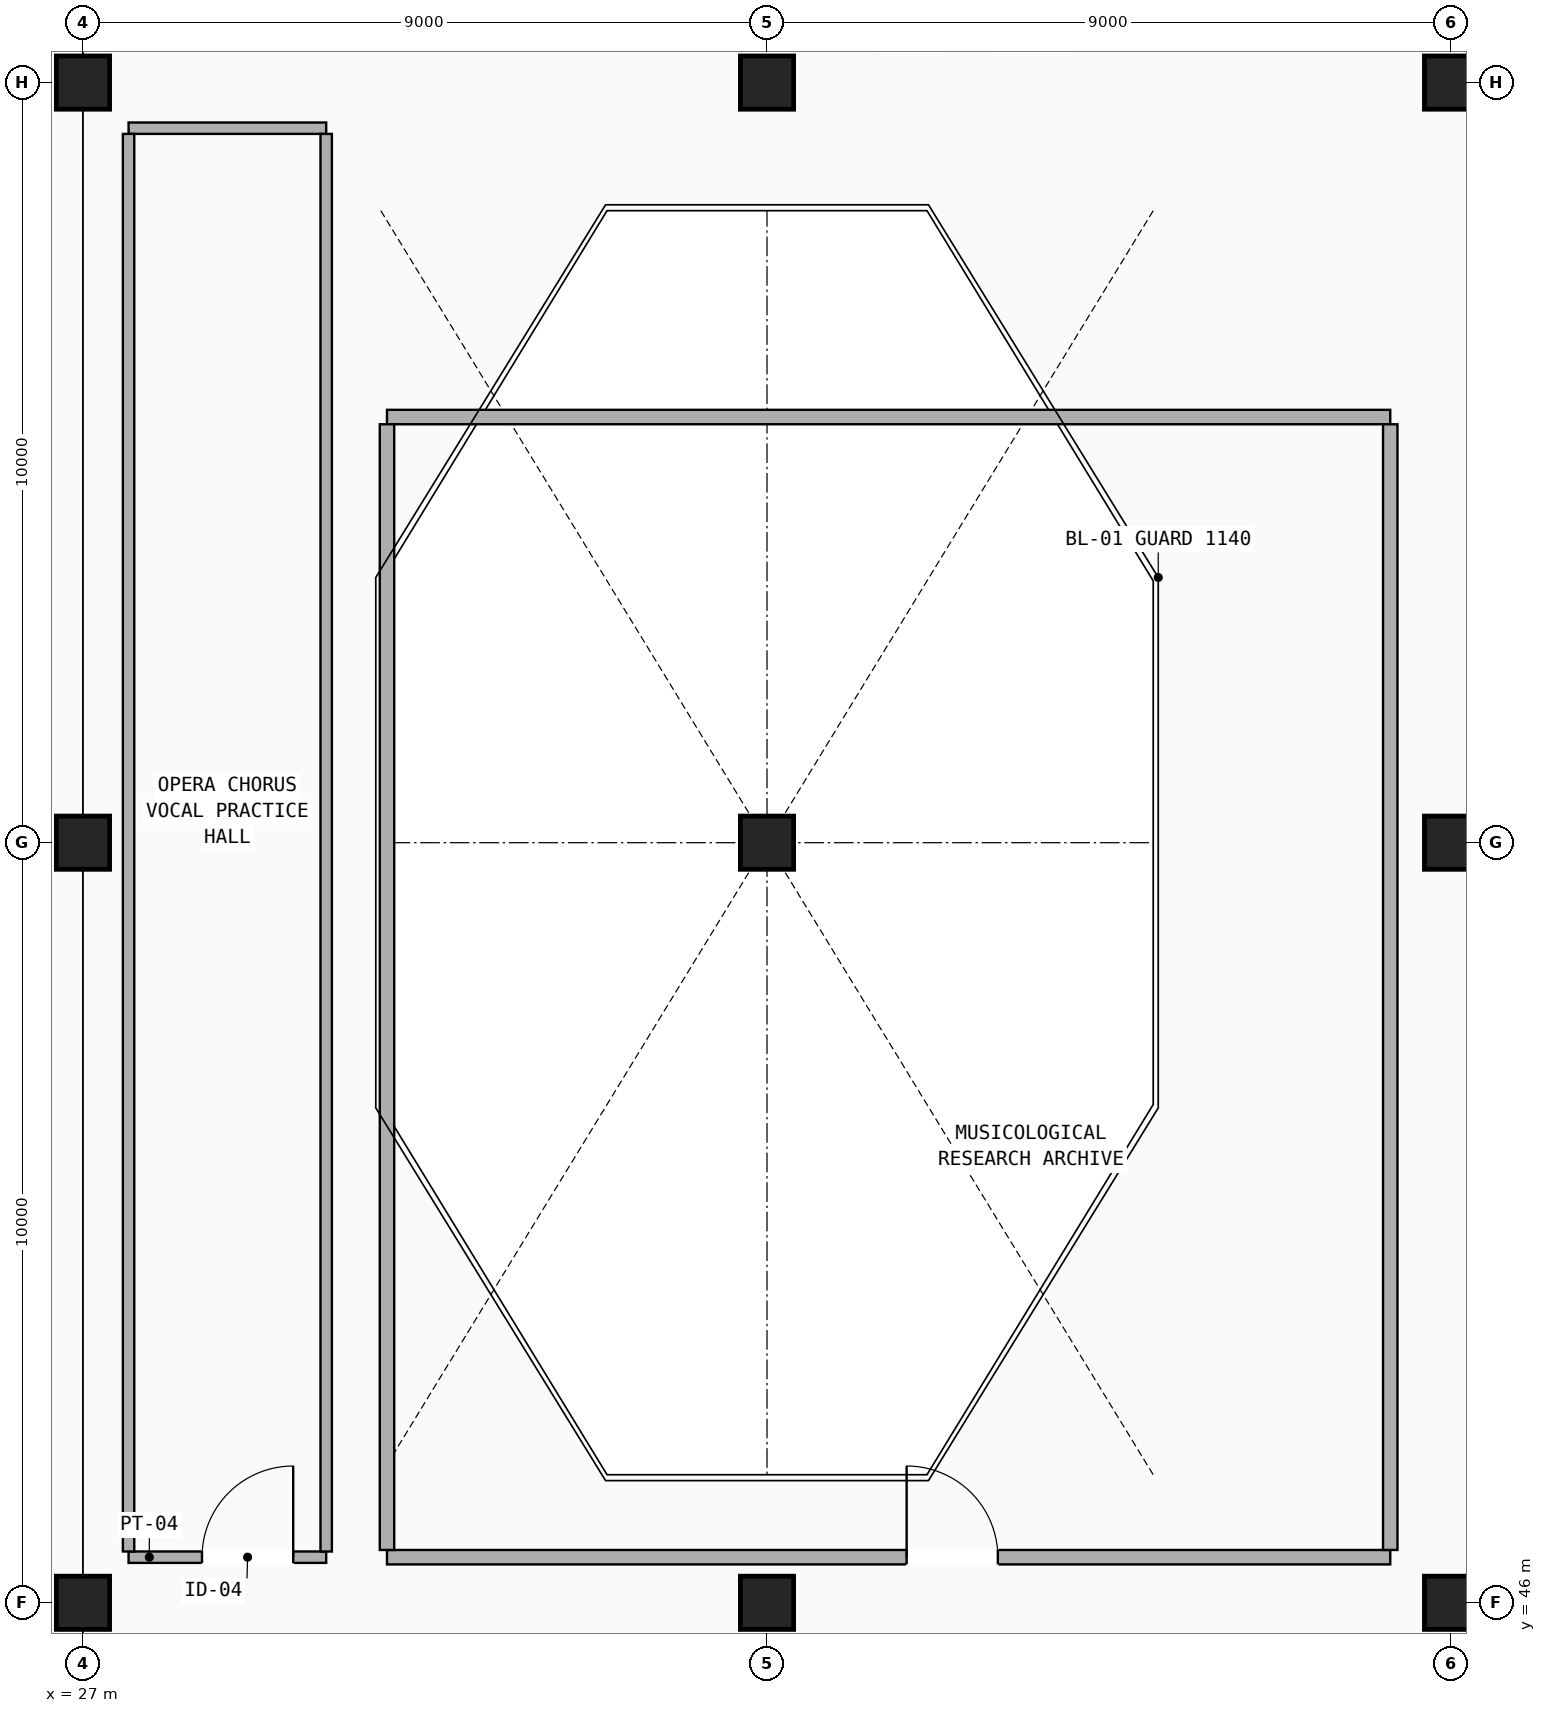
"""IFC4 building model, lengths in metres.
Left out: names, types, materials, properties, quantities, classifications, styles, units other than length and angle.
Written with IfcOpenShell. Run it as: python <this file> out.ifc"""

import sys

from ifc_helpers import new_model, si_unit, direction, frame, frame_2d, origin, origin_2d, place, context, subcontext, project, spatial, rectangle, extrude, element, fill, save


model = new_model("IFC4")
c1 = context("Model", 3, precision=1e-05, world=origin(), true_north=direction((0.0, 1.0)))
c2 = subcontext(c1, "Body", "Model", "MODEL_VIEW")
j1 = project(units=[si_unit("LENGTHUNIT", "METRE"), si_unit("PLANEANGLEUNIT", "RADIAN")], contexts=[c1])
p1 = place(None, origin())
s1 = spatial("IfcSite", under=j1, at=p1, CompositionType="ELEMENT")
p2 = place(p1, origin())
s2 = spatial("IfcBuilding", under=s1, at=p2, CompositionType="ELEMENT")
p3 = place(p2, frame((0.0, 0.0, 13.6)))
s3 = spatial("IfcBuildingStorey", under=s2, at=p3, CompositionType="ELEMENT", Elevation=13.6)
for number, where, z_axis, x_axis in (
    (1, (27.0, 46.0, 0.0), (0.0, 0.0, 1.0), (1.0, 0.0, 0.0)),
    (2, (27.0, 56.0, 0.0), (0.0, 0.0, 1.0), (1.0, 0.0, 0.0)),
    (3, (27.0, 66.0, 0.0), (0.0, 0.0, 1.0), (1.0, 0.0, 0.0)),
    (4, (36.0, 46.0, 0.0), (0.0, 0.0, 1.0), (1.0, 0.0, 0.0)),
    (5, (36.0, 56.0, 0.0), (0.0, 0.0, 1.0), (1.0, 0.0, 0.0)),
    (6, (36.0, 66.0, 0.0), (0.0, 0.0, 1.0), (1.0, 0.0, 0.0)),
    (7, (45.0, 46.0, 0.0), (0.0, 0.0, 1.0), (1.0, 0.0, 0.0)),
    (8, (45.0, 56.0, 0.0), (0.0, 0.0, 1.0), (1.0, 0.0, 0.0)),
    (9, (45.0, 66.0, 0.0), (0.0, 0.0, 1.0), (1.0, 0.0, 0.0)),
):
    element("IfcColumn", number, at=place(p3, frame(where, z_axis=z_axis, x_axis=x_axis)), inside=s3, PredefinedType="COLUMN", context=c2, shape_type="SweptSolid", body=[
        extrude(rectangle(XDim=0.7, YDim=0.7, at=origin_2d()), origin(), (0.0, 0.0, 1.0), 4.08),
    ])
p4 = place(p3, frame((27.6, 46.6, 0.0), z_axis=(0.0, 0.0, 1.0), x_axis=(1.0, 0.0, 0.0)))
e10 = element("IfcWall", 10, at=p4, inside=s3, PredefinedType="PARTITIONING", context=c2, shape_type="SweptSolid", body=[
    extrude(rectangle(XDim=2.6, YDim=0.15, at=frame_2d((1.3, 0.0))), origin(), (0.0, 0.0, 1.0), 3.84),
])
p5 = place(p4, frame((0.966, 0.0, 0.0)))
e11 = element("IfcOpeningElement", 11, at=p5, cuts=e10, PredefinedType="OPENING", context=c2, shape_type="SweptSolid", body=[
    extrude(rectangle(XDim=1.2, YDim=2.2, at=frame_2d((0.6, 1.1))), frame((0.0, 0.085, 0.0), z_axis=(0.0, -1.0, 0.0), x_axis=(1.0, 0.0, 0.0)), (0.0, 0.0, 1.0), 0.17),
])
p6 = place(p3, frame((27.6, 65.4, 0.0), z_axis=(0.0, 0.0, 1.0), x_axis=(1.0, 0.0, 0.0)))
e12 = element("IfcWall", 12, at=p6, inside=s3, PredefinedType="PARTITIONING", context=c2, shape_type="SweptSolid", body=[
    extrude(rectangle(XDim=2.6, YDim=0.15, at=frame_2d((1.3, 0.0))), origin(), (0.0, 0.0, 1.0), 3.84),
])
for number, where, z_axis, x_axis in (
    (13, (27.6, 46.675, 0.0), (0.0, 0.0, 1.0), (0.0, 1.0, 0.0)),
    (14, (30.2, 46.675, 0.0), (0.0, 0.0, 1.0), (0.0, 1.0, 0.0)),
):
    element("IfcWall", number, at=place(p3, frame(where, z_axis=z_axis, x_axis=x_axis)), inside=s3, PredefinedType="PARTITIONING", context=c2, shape_type="SweptSolid", body=[
        extrude(rectangle(XDim=18.65, YDim=0.15, at=frame_2d((9.325, 0.0))), origin(), (0.0, 0.0, 1.0), 2.82),
    ])
p7 = place(p3, frame((31.0, 46.6, 0.0), z_axis=(0.0, 0.0, 1.0), x_axis=(1.0, 0.0, 0.0)))
e15 = element("IfcWall", 15, at=p7, inside=s3, PredefinedType="PARTITIONING", context=c2, shape_type="SweptSolid", body=[
    extrude(rectangle(XDim=13.2, YDim=0.19, at=frame_2d((6.6, 0.0))), origin(), (0.0, 0.0, 1.0), 3.17),
])
p8 = place(p7, frame((6.837, 0.0, 0.0)))
e16 = element("IfcOpeningElement", 16, at=p8, cuts=e15, PredefinedType="OPENING", context=c2, shape_type="SweptSolid", body=[
    extrude(rectangle(XDim=1.2, YDim=2.2, at=frame_2d((0.6, 1.1))), frame((0.0, 0.105, 0.0), z_axis=(0.0, -1.0, 0.0), x_axis=(1.0, 0.0, 0.0)), (0.0, 0.0, 1.0), 0.21),
])
p9 = place(p3, frame((31.0, 61.6, 0.0), z_axis=(0.0, 0.0, 1.0), x_axis=(1.0, 0.0, 0.0)))
e17 = element("IfcWall", 17, at=p9, inside=s3, PredefinedType="PARTITIONING", context=c2, shape_type="SweptSolid", body=[
    extrude(rectangle(XDim=13.2, YDim=0.19, at=frame_2d((6.6, 0.0))), origin(), (0.0, 0.0, 1.0), 2.97),
])
p10 = place(p3, frame((31.0, 46.695, 0.0), z_axis=(0.0, 0.0, 1.0), x_axis=(0.0, 1.0, 0.0)))
e18 = element("IfcWall", 18, at=p10, inside=s3, PredefinedType="PARTITIONING", context=c2, shape_type="SweptSolid", body=[
    extrude(rectangle(XDim=14.81, YDim=0.19, at=frame_2d((7.405, 0.0))), origin(), (0.0, 0.0, 1.0), 2.82),
])
p11 = place(p3, frame((44.2, 46.695, 0.0), z_axis=(0.0, 0.0, 1.0), x_axis=(0.0, 1.0, 0.0)))
e19 = element("IfcWall", 19, at=p11, inside=s3, PredefinedType="PARTITIONING", context=c2, shape_type="SweptSolid", body=[
    extrude(rectangle(XDim=14.81, YDim=0.19, at=frame_2d((7.405, 0.0))), origin(), (0.0, 0.0, 1.0), 2.97),
])
p12 = place(p5, origin())
e20 = element("IfcDoor", 20, at=p12, inside=s3, OperationType="SINGLE_SWING_RIGHT", PredefinedType="DOOR", context=c2, shape_type="SweptSolid", body=[
    extrude(rectangle(XDim=1.2, YDim=2.2, at=frame_2d((0.6, 1.1))), frame((0.0, 0.025, 0.0), z_axis=(0.0, -1.0, 0.0), x_axis=(1.0, 0.0, 0.0)), (0.0, 0.0, 1.0), 0.05),
])
fill(e11, e20)
p13 = place(p8, origin())
e21 = element("IfcDoor", 21, at=p13, inside=s3, OperationType="SINGLE_SWING_LEFT", PredefinedType="DOOR", context=c2, shape_type="SweptSolid", body=[
    extrude(rectangle(XDim=1.2, YDim=2.2, at=frame_2d((0.6, 1.1))), frame((0.0, 0.025, 0.0), z_axis=(0.0, -1.0, 0.0), x_axis=(1.0, 0.0, 0.0)), (0.0, 0.0, 1.0), 0.05),
])
fill(e16, e21)
save(model, sys.argv[1])
